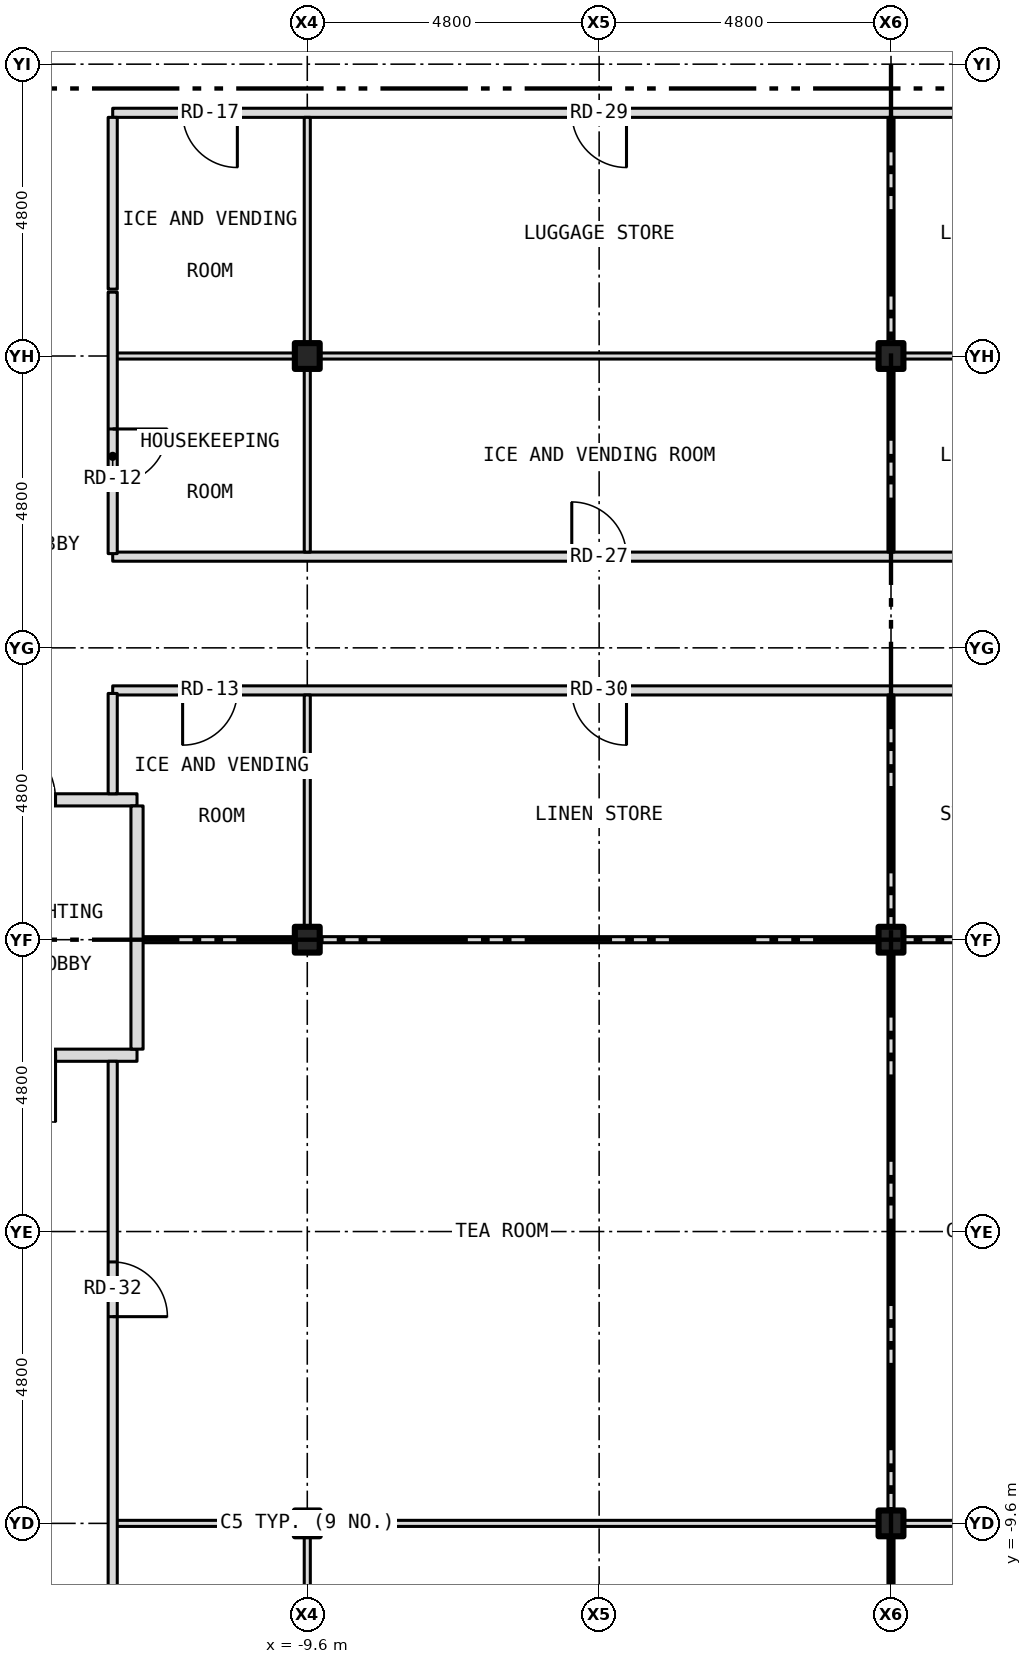
"""IFC4 building model, lengths in metres.
Left out: names, types, materials, properties, quantities, classifications, styles, units other than length and angle.
Written with IfcOpenShell. Run it as: python <this file> out.ifc"""

import sys

from ifc_helpers import new_model, si_unit, direction, frame, frame_2d, origin, origin_2d, place, context, subcontext, project, spatial, rectangle, i_section, extrude, element, fill, save


model = new_model("IFC4")
c1 = context("Model", 3, precision=1e-05, world=origin(), true_north=direction((0.0, 1.0)))
c2 = subcontext(c1, "Body", "Model", "MODEL_VIEW")
j1 = project(units=[si_unit("LENGTHUNIT", "METRE"), si_unit("PLANEANGLEUNIT", "RADIAN")], contexts=[c1])
p1 = place(None, origin())
s1 = spatial("IfcSite", under=j1, at=p1, CompositionType="ELEMENT")
p2 = place(p1, origin())
s2 = spatial("IfcBuilding", under=s1, at=p2, CompositionType="ELEMENT")
p3 = place(p2, frame((0.0, 0.0, 53.0)))
s3 = spatial("IfcBuildingStorey", under=s2, at=p3, CompositionType="ELEMENT", Elevation=53.0)
for number, where, z_axis, x_axis in (
    (1, (-9.6, -9.6, -0.15), (0.0, 0.0, 1.0), (1.0, 0.0, 0.0)),
    (2, (-9.6, 0.0, -0.15), (0.0, 0.0, 1.0), (1.0, 0.0, 0.0)),
    (3, (-9.6, 9.6, -0.15), (0.0, 0.0, 1.0), (1.0, 0.0, 0.0)),
    (4, (0.0, -9.6, -0.15), (0.0, 0.0, 1.0), (1.0, 0.0, 0.0)),
    (5, (0.0, 0.0, -0.15), (0.0, 0.0, 1.0), (1.0, 0.0, 0.0)),
    (6, (0.0, 9.6, -0.15), (0.0, 0.0, 1.0), (1.0, 0.0, 0.0)),
):
    element("IfcColumn", number, at=place(p3, frame(where, z_axis=z_axis, x_axis=x_axis)), inside=s3, PredefinedType="COLUMN", context=c2, shape_type="SweptSolid", body=[
        extrude(i_section(OverallWidth=0.409, OverallDepth=0.424, WebThickness=0.033, FlangeThickness=0.052, at=origin_2d()), origin(), (0.0, 0.0, 1.0), 3.5),
    ])
p4 = place(p3, frame((-12.8, -9.6, 0.0), z_axis=(0.0, 0.0, 1.0), x_axis=(1.0, 0.0, 0.0)))
e7 = element("IfcWall", 7, at=p4, inside=s3, PredefinedType="PARTITIONING", context=c2, shape_type="SweptSolid", body=[
    extrude(rectangle(XDim=2.996, YDim=0.1, at=frame_2d((1.498, 0.0))), origin(), (0.0, 0.0, 1.0), 2.728),
])
p5 = place(p3, frame((-9.804, -9.6, 0.0), z_axis=(0.0, 0.0, 1.0), x_axis=(1.0, 0.0, 0.0)))
e8 = element("IfcWall", 8, at=p5, inside=s3, PredefinedType="PARTITIONING", context=c2, shape_type="SweptSolid", body=[
    extrude(rectangle(XDim=0.408, YDim=0.1, at=frame_2d((0.204, 0.0))), origin(), (0.0, 0.0, 1.0), 3.35),
])
p6 = place(p3, frame((-9.396, -9.6, 0.0), z_axis=(0.0, 0.0, 1.0), x_axis=(1.0, 0.0, 0.0)))
e9 = element("IfcWall", 9, at=p6, inside=s3, PredefinedType="PARTITIONING", context=c2, shape_type="SweptSolid", body=[
    extrude(rectangle(XDim=9.192, YDim=0.1, at=frame_2d((4.596, 0.0))), origin(), (0.0, 0.0, 1.0), 2.728),
])
p7 = place(p3, frame((-0.204, -9.6, 0.0), z_axis=(0.0, 0.0, 1.0), x_axis=(1.0, 0.0, 0.0)))
e10 = element("IfcWall", 10, at=p7, inside=s3, PredefinedType="PARTITIONING", context=c2, shape_type="SweptSolid", body=[
    extrude(rectangle(XDim=0.408, YDim=0.1, at=frame_2d((0.204, 0.0))), origin(), (0.0, 0.0, 1.0), 3.35),
])
p8 = place(p3, frame((0.204, -9.6, 0.0), z_axis=(0.0, 0.0, 1.0), x_axis=(1.0, 0.0, 0.0)))
e11 = element("IfcWall", 11, at=p8, inside=s3, PredefinedType="PARTITIONING", context=c2, shape_type="SweptSolid", body=[
    extrude(rectangle(XDim=3.896, YDim=0.1, at=frame_2d((1.948, 0.0))), origin(), (0.0, 0.0, 1.0), 2.728),
])
p9 = place(p3, frame((-15.68, -1.9, 0.0), z_axis=(0.0, 0.0, 1.0), x_axis=(1.0, 0.0, 0.0)))
e12 = element("IfcWall", 12, at=p9, inside=s3, PredefinedType="PARTITIONING", context=c2, shape_type="SweptSolid", body=[
    extrude(rectangle(XDim=3.28, YDim=0.2, at=frame_2d((1.64, 0.0))), origin(), (0.0, 0.0, 1.0), 3.35),
])
p10 = place(p9, frame((0.84, 0.0, 0.0)))
e13 = element("IfcOpeningElement", 13, at=p10, cuts=e12, PredefinedType="OPENING", context=c2, shape_type="SweptSolid", body=[
    extrude(rectangle(XDim=1.1, YDim=2.1, at=frame_2d((0.55, 1.05))), frame((0.0, 0.112, 0.0), z_axis=(0.0, -1.0, 0.0), x_axis=(1.0, 0.0, 0.0)), (0.0, 0.0, 1.0), 0.224),
])
p11 = place(p3, frame((-12.4, 0.0, 0.0), z_axis=(0.0, 0.0, 1.0), x_axis=(1.0, 0.0, 0.0)))
e14 = element("IfcWall", 14, at=p11, inside=s3, PredefinedType="PARTITIONING", context=c2, shape_type="SweptSolid", body=[
    extrude(rectangle(XDim=2.596, YDim=0.1, at=frame_2d((1.298, 0.0))), origin(), (0.0, 0.0, 1.0), 2.728),
])
p12 = place(p3, frame((-9.804, 0.0, 0.0), z_axis=(0.0, 0.0, 1.0), x_axis=(1.0, 0.0, 0.0)))
e15 = element("IfcWall", 15, at=p12, inside=s3, PredefinedType="PARTITIONING", context=c2, shape_type="SweptSolid", body=[
    extrude(rectangle(XDim=0.408, YDim=0.1, at=frame_2d((0.204, 0.0))), origin(), (0.0, 0.0, 1.0), 3.35),
])
p13 = place(p3, frame((-9.396, 0.0, 0.0), z_axis=(0.0, 0.0, 1.0), x_axis=(1.0, 0.0, 0.0)))
e16 = element("IfcWall", 16, at=p13, inside=s3, PredefinedType="PARTITIONING", context=c2, shape_type="SweptSolid", body=[
    extrude(rectangle(XDim=9.192, YDim=0.1, at=frame_2d((4.596, 0.0))), origin(), (0.0, 0.0, 1.0), 2.728),
])
p14 = place(p3, frame((-0.204, 0.0, 0.0), z_axis=(0.0, 0.0, 1.0), x_axis=(1.0, 0.0, 0.0)))
e17 = element("IfcWall", 17, at=p14, inside=s3, PredefinedType="PARTITIONING", context=c2, shape_type="SweptSolid", body=[
    extrude(rectangle(XDim=0.408, YDim=0.1, at=frame_2d((0.204, 0.0))), origin(), (0.0, 0.0, 1.0), 3.35),
])
p15 = place(p3, frame((0.204, 0.0, 0.0), z_axis=(0.0, 0.0, 1.0), x_axis=(1.0, 0.0, 0.0)))
e18 = element("IfcWall", 18, at=p15, inside=s3, PredefinedType="PARTITIONING", context=c2, shape_type="SweptSolid", body=[
    extrude(rectangle(XDim=3.896, YDim=0.1, at=frame_2d((1.948, 0.0))), origin(), (0.0, 0.0, 1.0), 2.728),
])
p16 = place(p3, frame((-15.68, 2.3, 0.0), z_axis=(0.0, 0.0, 1.0), x_axis=(1.0, 0.0, 0.0)))
e19 = element("IfcWall", 19, at=p16, inside=s3, PredefinedType="PARTITIONING", context=c2, shape_type="SweptSolid", body=[
    extrude(rectangle(XDim=3.28, YDim=0.2, at=frame_2d((1.64, 0.0))), origin(), (0.0, 0.0, 1.0), 3.35),
])
p17 = place(p16, frame((0.84, 0.0, 0.0)))
e20 = element("IfcOpeningElement", 20, at=p17, cuts=e19, PredefinedType="OPENING", context=c2, shape_type="SweptSolid", body=[
    extrude(rectangle(XDim=1.1, YDim=2.1, at=frame_2d((0.55, 1.05))), frame((0.0, 0.112, 0.0), z_axis=(0.0, -1.0, 0.0), x_axis=(1.0, 0.0, 0.0)), (0.0, 0.0, 1.0), 0.224),
])
p18 = place(p3, frame((-12.8, 4.1, 0.0), z_axis=(0.0, 0.0, 1.0), x_axis=(1.0, 0.0, 0.0)))
e21 = element("IfcWall", 21, at=p18, inside=s3, PredefinedType="PARTITIONING", context=c2, shape_type="SweptSolid", body=[
    extrude(rectangle(XDim=16.9, YDim=0.15, at=frame_2d((8.45, 0.0))), origin(), (0.0, 0.0, 1.0), 3.35),
])
p19 = place(p18, frame((1.15, 0.0, 0.0)))
e22 = element("IfcOpeningElement", 22, at=p19, cuts=e21, PredefinedType="OPENING", context=c2, shape_type="SweptSolid", body=[
    extrude(rectangle(XDim=0.9, YDim=2.1, at=frame_2d((0.45, 1.05))), frame((0.0, 0.087, 0.0), z_axis=(0.0, -1.0, 0.0), x_axis=(1.0, 0.0, 0.0)), (0.0, 0.0, 1.0), 0.174),
])
p20 = place(p18, frame((14.4, 0.0, 0.0)))
e23 = element("IfcOpeningElement", 23, at=p20, cuts=e21, PredefinedType="OPENING", context=c2, shape_type="SweptSolid", body=[
    extrude(rectangle(XDim=0.9, YDim=2.1, at=frame_2d((0.45, 1.05))), frame((0.0, 0.087, 0.0), z_axis=(0.0, -1.0, 0.0), x_axis=(1.0, 0.0, 0.0)), (0.0, 0.0, 1.0), 0.174),
])
p21 = place(p18, frame((7.55, 0.0, 0.0)))
e24 = element("IfcOpeningElement", 24, at=p21, cuts=e21, PredefinedType="OPENING", context=c2, shape_type="SweptSolid", body=[
    extrude(rectangle(XDim=0.9, YDim=2.1, at=frame_2d((0.45, 1.05))), frame((0.0, 0.087, 0.0), z_axis=(0.0, -1.0, 0.0), x_axis=(1.0, 0.0, 0.0)), (0.0, 0.0, 1.0), 0.174),
])
p22 = place(p3, frame((-12.8, 6.3, 0.0), z_axis=(0.0, 0.0, 1.0), x_axis=(1.0, 0.0, 0.0)))
e25 = element("IfcWall", 25, at=p22, inside=s3, PredefinedType="PARTITIONING", context=c2, shape_type="SweptSolid", body=[
    extrude(rectangle(XDim=16.9, YDim=0.15, at=frame_2d((8.45, 0.0))), origin(), (0.0, 0.0, 1.0), 3.35),
])
p23 = place(p22, frame((14.4, 0.0, 0.0)))
e26 = element("IfcOpeningElement", 26, at=p23, cuts=e25, PredefinedType="OPENING", context=c2, shape_type="SweptSolid", body=[
    extrude(rectangle(XDim=0.9, YDim=2.1, at=frame_2d((0.45, 1.05))), frame((0.0, 0.087, 0.0), z_axis=(0.0, -1.0, 0.0), x_axis=(1.0, 0.0, 0.0)), (0.0, 0.0, 1.0), 0.174),
])
p24 = place(p22, frame((7.55, 0.0, 0.0)))
e27 = element("IfcOpeningElement", 27, at=p24, cuts=e25, PredefinedType="OPENING", context=c2, shape_type="SweptSolid", body=[
    extrude(rectangle(XDim=0.9, YDim=2.1, at=frame_2d((0.45, 1.05))), frame((0.0, 0.087, 0.0), z_axis=(0.0, -1.0, 0.0), x_axis=(1.0, 0.0, 0.0)), (0.0, 0.0, 1.0), 0.174),
])
p25 = place(p3, frame((-12.8, 9.6, 0.0), z_axis=(0.0, 0.0, 1.0), x_axis=(1.0, 0.0, 0.0)))
e28 = element("IfcWall", 28, at=p25, inside=s3, PredefinedType="PARTITIONING", context=c2, shape_type="SweptSolid", body=[
    extrude(rectangle(XDim=2.996, YDim=0.1, at=frame_2d((1.498, 0.0))), origin(), (0.0, 0.0, 1.0), 2.728),
])
p26 = place(p3, frame((-9.804, 9.6, 0.0), z_axis=(0.0, 0.0, 1.0), x_axis=(1.0, 0.0, 0.0)))
e29 = element("IfcWall", 29, at=p26, inside=s3, PredefinedType="PARTITIONING", context=c2, shape_type="SweptSolid", body=[
    extrude(rectangle(XDim=0.408, YDim=0.1, at=frame_2d((0.204, 0.0))), origin(), (0.0, 0.0, 1.0), 3.35),
])
p27 = place(p3, frame((-9.396, 9.6, 0.0), z_axis=(0.0, 0.0, 1.0), x_axis=(1.0, 0.0, 0.0)))
e30 = element("IfcWall", 30, at=p27, inside=s3, PredefinedType="PARTITIONING", context=c2, shape_type="SweptSolid", body=[
    extrude(rectangle(XDim=9.192, YDim=0.1, at=frame_2d((4.596, 0.0))), origin(), (0.0, 0.0, 1.0), 2.728),
])
p28 = place(p3, frame((-0.204, 9.6, 0.0), z_axis=(0.0, 0.0, 1.0), x_axis=(1.0, 0.0, 0.0)))
e31 = element("IfcWall", 31, at=p28, inside=s3, PredefinedType="PARTITIONING", context=c2, shape_type="SweptSolid", body=[
    extrude(rectangle(XDim=0.408, YDim=0.1, at=frame_2d((0.204, 0.0))), origin(), (0.0, 0.0, 1.0), 3.35),
])
p29 = place(p3, frame((0.204, 9.6, 0.0), z_axis=(0.0, 0.0, 1.0), x_axis=(1.0, 0.0, 0.0)))
e32 = element("IfcWall", 32, at=p29, inside=s3, PredefinedType="PARTITIONING", context=c2, shape_type="SweptSolid", body=[
    extrude(rectangle(XDim=3.896, YDim=0.1, at=frame_2d((1.948, 0.0))), origin(), (0.0, 0.0, 1.0), 2.728),
])
p30 = place(p3, frame((-12.8, 13.6, 0.0), z_axis=(0.0, 0.0, 1.0), x_axis=(1.0, 0.0, 0.0)))
e33 = element("IfcWall", 33, at=p30, inside=s3, PredefinedType="PARTITIONING", context=c2, shape_type="SweptSolid", body=[
    extrude(rectangle(XDim=16.9, YDim=0.15, at=frame_2d((8.45, 0.0))), origin(), (0.0, 0.0, 1.0), 3.35),
])
p31 = place(p30, frame((1.15, 0.0, 0.0)))
e34 = element("IfcOpeningElement", 34, at=p31, cuts=e33, PredefinedType="OPENING", context=c2, shape_type="SweptSolid", body=[
    extrude(rectangle(XDim=0.9, YDim=2.1, at=frame_2d((0.45, 1.05))), frame((0.0, 0.087, 0.0), z_axis=(0.0, -1.0, 0.0), x_axis=(1.0, 0.0, 0.0)), (0.0, 0.0, 1.0), 0.174),
])
p32 = place(p30, frame((14.4, 0.0, 0.0)))
e35 = element("IfcOpeningElement", 35, at=p32, cuts=e33, PredefinedType="OPENING", context=c2, shape_type="SweptSolid", body=[
    extrude(rectangle(XDim=0.9, YDim=2.1, at=frame_2d((0.45, 1.05))), frame((0.0, 0.087, 0.0), z_axis=(0.0, -1.0, 0.0), x_axis=(1.0, 0.0, 0.0)), (0.0, 0.0, 1.0), 0.174),
])
p33 = place(p30, frame((7.55, 0.0, 0.0)))
e36 = element("IfcOpeningElement", 36, at=p33, cuts=e33, PredefinedType="OPENING", context=c2, shape_type="SweptSolid", body=[
    extrude(rectangle(XDim=0.9, YDim=2.1, at=frame_2d((0.45, 1.05))), frame((0.0, 0.087, 0.0), z_axis=(0.0, -1.0, 0.0), x_axis=(1.0, 0.0, 0.0)), (0.0, 0.0, 1.0), 0.174),
])
p34 = place(p3, frame((-12.8, -13.525, 0.0), z_axis=(0.0, 0.0, 1.0), x_axis=(0.0, 1.0, 0.0)))
e37 = element("IfcWall", 37, at=p34, inside=s3, PredefinedType="PARTITIONING", context=c2, shape_type="SweptSolid", body=[
    extrude(rectangle(XDim=11.525, YDim=0.15, at=frame_2d((5.762, 0.0))), origin(), (0.0, 0.0, 1.0), 3.35),
])
p35 = place(p34, frame((7.325, 0.0, 0.0)))
e38 = element("IfcOpeningElement", 38, at=p35, cuts=e37, PredefinedType="OPENING", context=c2, shape_type="SweptSolid", body=[
    extrude(rectangle(XDim=0.9, YDim=2.1, at=frame_2d((0.45, 1.05))), frame((0.0, 0.087, 0.0), z_axis=(0.0, -1.0, 0.0), x_axis=(1.0, 0.0, 0.0)), (0.0, 0.0, 1.0), 0.174),
])
p36 = place(p3, frame((-12.8, 2.4, 0.0), z_axis=(0.0, 0.0, 1.0), x_axis=(0.0, 1.0, 0.0)))
e39 = element("IfcWall", 39, at=p36, inside=s3, PredefinedType="PARTITIONING", context=c2, shape_type="SweptSolid", body=[
    extrude(rectangle(XDim=1.65, YDim=0.15, at=frame_2d((0.825, 0.0))), origin(), (0.0, 0.0, 1.0), 3.35),
])
p37 = place(p3, frame((-12.8, 6.35, 0.0), z_axis=(0.0, 0.0, 1.0), x_axis=(0.0, 1.0, 0.0)))
e40 = element("IfcWall", 40, at=p37, inside=s3, PredefinedType="PARTITIONING", context=c2, shape_type="SweptSolid", body=[
    extrude(rectangle(XDim=4.3, YDim=0.15, at=frame_2d((2.15, 0.0))), origin(), (0.0, 0.0, 1.0), 3.35),
])
p38 = place(p37, frame((1.15, 0.0, 0.0)))
e41 = element("IfcOpeningElement", 41, at=p38, cuts=e40, PredefinedType="OPENING", context=c2, shape_type="SweptSolid", body=[
    extrude(rectangle(XDim=0.9, YDim=2.1, at=frame_2d((0.45, 1.05))), frame((0.0, 0.087, 0.0), z_axis=(0.0, -1.0, 0.0), x_axis=(1.0, 0.0, 0.0)), (0.0, 0.0, 1.0), 0.174),
])
p39 = place(p3, frame((-12.8, 10.7, 0.0), z_axis=(0.0, 0.0, 1.0), x_axis=(0.0, 1.0, 0.0)))
e42 = element("IfcWall", 42, at=p39, inside=s3, PredefinedType="PARTITIONING", context=c2, shape_type="SweptSolid", body=[
    extrude(rectangle(XDim=2.825, YDim=0.15, at=frame_2d((1.413, 0.0))), origin(), (0.0, 0.0, 1.0), 3.35),
])
p40 = place(p3, frame((-12.4, -1.8, 0.0), z_axis=(0.0, 0.0, 1.0), x_axis=(0.0, 1.0, 0.0)))
e43 = element("IfcWall", 43, at=p40, inside=s3, PredefinedType="PARTITIONING", context=c2, shape_type="SweptSolid", body=[
    extrude(rectangle(XDim=4.0, YDim=0.2, at=frame_2d((2.0, 0.0))), origin(), (0.0, 0.0, 1.0), 3.35),
])
p41 = place(p3, frame((-9.6, -13.525, 0.0), z_axis=(0.0, 0.0, 1.0), x_axis=(0.0, 1.0, 0.0)))
e44 = element("IfcWall", 44, at=p41, inside=s3, PredefinedType="PARTITIONING", context=c2, shape_type="SweptSolid", body=[
    extrude(rectangle(XDim=3.875, YDim=0.1, at=frame_2d((1.938, 0.0))), origin(), (0.0, 0.0, 1.0), 2.728),
])
p42 = place(p3, frame((-9.6, 0.05, 0.0), z_axis=(0.0, 0.0, 1.0), x_axis=(0.0, 1.0, 0.0)))
e45 = element("IfcWall", 45, at=p42, inside=s3, PredefinedType="PARTITIONING", context=c2, shape_type="SweptSolid", body=[
    extrude(rectangle(XDim=3.975, YDim=0.1, at=frame_2d((1.987, 0.0))), origin(), (0.0, 0.0, 1.0), 2.728),
])
p43 = place(p3, frame((-9.6, 6.375, 0.0), z_axis=(0.0, 0.0, 1.0), x_axis=(0.0, 1.0, 0.0)))
e46 = element("IfcWall", 46, at=p43, inside=s3, PredefinedType="PARTITIONING", context=c2, shape_type="SweptSolid", body=[
    extrude(rectangle(XDim=3.175, YDim=0.1, at=frame_2d((1.587, 0.0))), origin(), (0.0, 0.0, 1.0), 2.728),
])
for number, where, z_axis, x_axis in (
    (47, (-9.6, 9.65, 0.0), (0.0, 0.0, 1.0), (0.0, 1.0, 0.0)),
    (48, (0.0, -13.525, 0.0), (0.0, 0.0, 1.0), (0.0, 1.0, 0.0)),
):
    element("IfcWall", number, at=place(p3, frame(where, z_axis=z_axis, x_axis=x_axis)), inside=s3, PredefinedType="PARTITIONING", context=c2, shape_type="SweptSolid", body=[
        extrude(rectangle(XDim=3.875, YDim=0.1, at=frame_2d((1.938, 0.0))), origin(), (0.0, 0.0, 1.0), 2.728),
    ])
p44 = place(p3, frame((0.0, -9.55, 0.0), z_axis=(0.0, 0.0, 1.0), x_axis=(0.0, 1.0, 0.0)))
e49 = element("IfcWall", 49, at=p44, inside=s3, PredefinedType="PARTITIONING", context=c2, shape_type="SweptSolid", body=[
    extrude(rectangle(XDim=9.5, YDim=0.1, at=frame_2d((4.75, 0.0))), origin(), (0.0, 0.0, 1.0), 2.728),
])
p45 = place(p3, frame((0.0, 0.05, 0.0), z_axis=(0.0, 0.0, 1.0), x_axis=(0.0, 1.0, 0.0)))
e50 = element("IfcWall", 50, at=p45, inside=s3, PredefinedType="PARTITIONING", context=c2, shape_type="SweptSolid", body=[
    extrude(rectangle(XDim=3.975, YDim=0.1, at=frame_2d((1.987, 0.0))), origin(), (0.0, 0.0, 1.0), 2.728),
])
p46 = place(p3, frame((0.0, 6.375, 0.0), z_axis=(0.0, 0.0, 1.0), x_axis=(0.0, 1.0, 0.0)))
e51 = element("IfcWall", 51, at=p46, inside=s3, PredefinedType="PARTITIONING", context=c2, shape_type="SweptSolid", body=[
    extrude(rectangle(XDim=3.175, YDim=0.1, at=frame_2d((1.587, 0.0))), origin(), (0.0, 0.0, 1.0), 2.728),
])
p47 = place(p3, frame((0.0, 9.65, 0.0), z_axis=(0.0, 0.0, 1.0), x_axis=(0.0, 1.0, 0.0)))
e52 = element("IfcWall", 52, at=p47, inside=s3, PredefinedType="PARTITIONING", context=c2, shape_type="SweptSolid", body=[
    extrude(rectangle(XDim=3.875, YDim=0.1, at=frame_2d((1.938, 0.0))), origin(), (0.0, 0.0, 1.0), 2.728),
])
p48 = place(p17, origin())
e53 = element("IfcDoor", 53, at=p48, inside=s3, OperationType="SINGLE_SWING_LEFT", PredefinedType="DOOR", context=c2, shape_type="SweptSolid", body=[
    extrude(rectangle(XDim=1.1, YDim=2.1, at=frame_2d((0.55, 1.05))), frame((0.0, 0.025, 0.0), z_axis=(0.0, -1.0, 0.0), x_axis=(1.0, 0.0, 0.0)), (0.0, 0.0, 1.0), 0.05),
])
fill(e20, e53)
p49 = place(p10, origin())
e54 = element("IfcDoor", 54, at=p49, inside=s3, OperationType="SINGLE_SWING_RIGHT", PredefinedType="DOOR", context=c2, shape_type="SweptSolid", body=[
    extrude(rectangle(XDim=1.1, YDim=2.1, at=frame_2d((0.55, 1.05))), frame((0.0, 0.025, 0.0), z_axis=(0.0, -1.0, 0.0), x_axis=(1.0, 0.0, 0.0)), (0.0, 0.0, 1.0), 0.05),
])
fill(e13, e54)
p50 = place(p38, origin())
e55 = element("IfcDoor", 55, at=p50, inside=s3, OperationType="SINGLE_SWING_RIGHT", PredefinedType="DOOR", context=c2, shape_type="SweptSolid", body=[
    extrude(rectangle(XDim=0.9, YDim=2.1, at=frame_2d((0.45, 1.05))), frame((0.0, 0.025, 0.0), z_axis=(0.0, -1.0, 0.0), x_axis=(1.0, 0.0, 0.0)), (0.0, 0.0, 1.0), 0.05),
])
fill(e41, e55)
p51 = place(p19, origin())
e56 = element("IfcDoor", 56, at=p51, inside=s3, OperationType="SINGLE_SWING_LEFT", PredefinedType="DOOR", context=c2, shape_type="SweptSolid", body=[
    extrude(rectangle(XDim=0.9, YDim=2.1, at=frame_2d((0.45, 1.05))), frame((0.0, 0.025, 0.0), z_axis=(0.0, -1.0, 0.0), x_axis=(1.0, 0.0, 0.0)), (0.0, 0.0, 1.0), 0.05),
])
fill(e22, e56)
p52 = place(p31, origin())
e57 = element("IfcDoor", 57, at=p52, inside=s3, OperationType="SINGLE_SWING_RIGHT", PredefinedType="DOOR", context=c2, shape_type="SweptSolid", body=[
    extrude(rectangle(XDim=0.9, YDim=2.1, at=frame_2d((0.45, 1.05))), frame((0.0, 0.025, 0.0), z_axis=(0.0, -1.0, 0.0), x_axis=(1.0, 0.0, 0.0)), (0.0, 0.0, 1.0), 0.05),
])
fill(e34, e57)
p53 = place(p24, origin())
e58 = element("IfcDoor", 58, at=p53, inside=s3, OperationType="SINGLE_SWING_LEFT", PredefinedType="DOOR", context=c2, shape_type="SweptSolid", body=[
    extrude(rectangle(XDim=0.9, YDim=2.1, at=frame_2d((0.45, 1.05))), frame((0.0, 0.025, 0.0), z_axis=(0.0, -1.0, 0.0), x_axis=(1.0, 0.0, 0.0)), (0.0, 0.0, 1.0), 0.05),
])
fill(e27, e58)
p54 = place(p33, origin())
e59 = element("IfcDoor", 59, at=p54, inside=s3, OperationType="SINGLE_SWING_RIGHT", PredefinedType="DOOR", context=c2, shape_type="SweptSolid", body=[
    extrude(rectangle(XDim=0.9, YDim=2.1, at=frame_2d((0.45, 1.05))), frame((0.0, 0.025, 0.0), z_axis=(0.0, -1.0, 0.0), x_axis=(1.0, 0.0, 0.0)), (0.0, 0.0, 1.0), 0.05),
])
fill(e36, e59)
p55 = place(p21, origin())
e60 = element("IfcDoor", 60, at=p55, inside=s3, OperationType="SINGLE_SWING_RIGHT", PredefinedType="DOOR", context=c2, shape_type="SweptSolid", body=[
    extrude(rectangle(XDim=0.9, YDim=2.1, at=frame_2d((0.45, 1.05))), frame((0.0, 0.025, 0.0), z_axis=(0.0, -1.0, 0.0), x_axis=(1.0, 0.0, 0.0)), (0.0, 0.0, 1.0), 0.05),
])
fill(e24, e60)
p56 = place(p35, origin())
e61 = element("IfcDoor", 61, at=p56, inside=s3, OperationType="SINGLE_SWING_LEFT", PredefinedType="DOOR", context=c2, shape_type="SweptSolid", body=[
    extrude(rectangle(XDim=0.9, YDim=2.1, at=frame_2d((0.45, 1.05))), frame((0.0, 0.025, 0.0), z_axis=(0.0, -1.0, 0.0), x_axis=(1.0, 0.0, 0.0)), (0.0, 0.0, 1.0), 0.05),
])
fill(e38, e61)
save(model, sys.argv[1])
